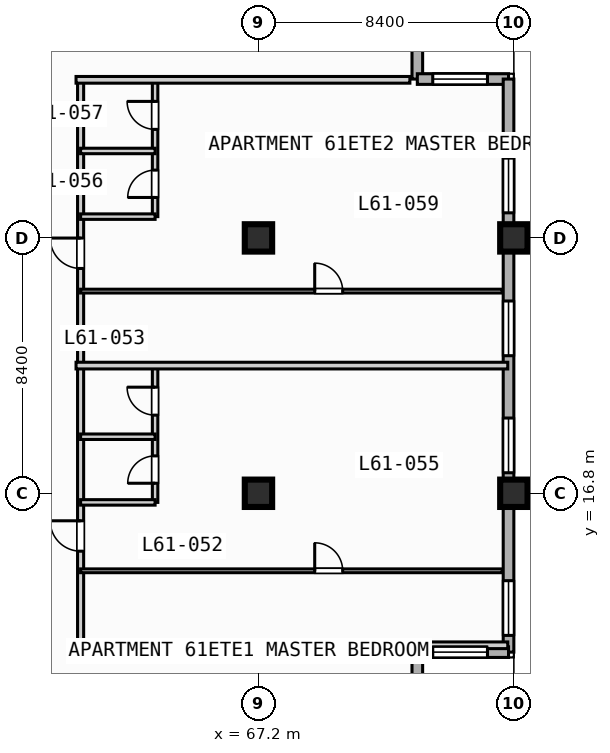
"""IFC4 building model, lengths in metres.
Left out: names, types, materials, properties, quantities, classifications, styles, units other than length and angle.
Written with IfcOpenShell. Run it as: python <this file> out.ifc"""

import sys

from ifc_helpers import new_model, si_unit, direction, frame, frame_2d, origin, origin_2d, place, context, subcontext, project, spatial, rectangle, extrude, element, fill, save


model = new_model("IFC4")
c1 = context("Model", 3, precision=1e-05, world=origin(), true_north=direction((0.0, 1.0)))
c2 = subcontext(c1, "Body", "Model", "MODEL_VIEW")
j1 = project(units=[si_unit("LENGTHUNIT", "METRE"), si_unit("PLANEANGLEUNIT", "RADIAN")], contexts=[c1])
p1 = place(None, origin())
s1 = spatial("IfcSite", under=j1, at=p1, CompositionType="ELEMENT")
p2 = place(p1, origin())
s2 = spatial("IfcBuilding", under=s1, at=p2, CompositionType="ELEMENT")
p3 = place(p2, frame((0.0, 0.0, 249.0)))
s3 = spatial("IfcBuildingStorey", under=s2, at=p3, CompositionType="ELEMENT", Elevation=249.0)
for number, where, z_axis, x_axis in (
    (1, (67.2, 16.8, 0.0), (0.0, 0.0, 1.0), (1.0, 0.0, 0.0)),
    (2, (67.2, 25.2, 0.0), (0.0, 0.0, 1.0), (1.0, 0.0, 0.0)),
    (3, (75.6, 16.8, 0.0), (0.0, 0.0, 1.0), (1.0, 0.0, 0.0)),
    (4, (75.6, 25.2, 0.0), (0.0, 0.0, 1.0), (1.0, 0.0, 0.0)),
):
    element("IfcColumn", number, at=place(p3, frame(where, z_axis=z_axis, x_axis=x_axis)), inside=s3, PredefinedType="COLUMN", context=c2, shape_type="SweptSolid", body=[
        extrude(rectangle(XDim=0.9, YDim=0.9, at=origin_2d()), origin(), (0.0, 0.0, 1.0), 3.7),
    ])
p4 = place(p3, frame((72.425, 33.425, 0.0), z_axis=(0.0, 0.0, 1.0), x_axis=(0.0, -1.0, 0.0)))
e5 = element("IfcWall", 5, at=p4, inside=s3, PredefinedType="STANDARD", context=c2, shape_type="SweptSolid", body=[
    extrude(rectangle(XDim=3.0, YDim=0.35, at=frame_2d((1.5, 0.0))), origin(), (0.0, 0.0, 1.0), 3.47),
])
p5 = place(p3, frame((72.425, 30.425, 0.0), z_axis=(0.0, 0.0, 1.0), x_axis=(1.0, 0.0, 0.0)))
e6 = element("IfcWall", 6, at=p5, inside=s3, PredefinedType="STANDARD", context=c2, shape_type="SweptSolid", body=[
    extrude(rectangle(XDim=3.0, YDim=0.35, at=frame_2d((1.5, 0.0))), origin(), (0.0, 0.0, 1.0), 3.47),
])
p6 = place(p5, frame((0.508, 0.0, 0.85)))
e7 = element("IfcOpeningElement", 7, at=p6, cuts=e6, PredefinedType="OPENING", context=c2, shape_type="SweptSolid", body=[
    extrude(rectangle(XDim=1.8, YDim=1.8, at=frame_2d((0.9, 0.9))), frame((0.0, 0.185, 0.0), z_axis=(0.0, -1.0, 0.0), x_axis=(1.0, 0.0, 0.0)), (0.0, 0.0, 1.0), 0.37),
])
p7 = place(p3, frame((75.425, 30.425, 0.0), z_axis=(0.0, 0.0, 1.0), x_axis=(0.0, -1.0, 0.0)))
e8 = element("IfcWall", 8, at=p7, inside=s3, PredefinedType="STANDARD", context=c2, shape_type="SweptSolid", body=[
    extrude(rectangle(XDim=18.85, YDim=0.35, at=frame_2d((9.425, 0.0))), origin(), (0.0, 0.0, 1.0), 3.47),
])
p8 = place(p7, frame((16.5, 0.0, 0.85)))
e9 = element("IfcOpeningElement", 9, at=p8, cuts=e8, PredefinedType="OPENING", context=c2, shape_type="SweptSolid", body=[
    extrude(rectangle(XDim=1.8, YDim=1.8, at=frame_2d((0.9, 0.9))), frame((0.0, 0.185, 0.0), z_axis=(0.0, -1.0, 0.0), x_axis=(1.0, 0.0, 0.0)), (0.0, 0.0, 1.0), 0.37),
])
p9 = place(p7, frame((11.15, 0.0, 0.85)))
e10 = element("IfcOpeningElement", 10, at=p9, cuts=e8, PredefinedType="OPENING", context=c2, shape_type="SweptSolid", body=[
    extrude(rectangle(XDim=1.8, YDim=1.8, at=frame_2d((0.9, 0.9))), frame((0.0, 0.185, 0.0), z_axis=(0.0, -1.0, 0.0), x_axis=(1.0, 0.0, 0.0)), (0.0, 0.0, 1.0), 0.37),
])
p10 = place(p7, frame((7.3, 0.0, 0.85)))
e11 = element("IfcOpeningElement", 11, at=p10, cuts=e8, PredefinedType="OPENING", context=c2, shape_type="SweptSolid", body=[
    extrude(rectangle(XDim=1.8, YDim=1.8, at=frame_2d((0.9, 0.9))), frame((0.0, 0.185, 0.0), z_axis=(0.0, -1.0, 0.0), x_axis=(1.0, 0.0, 0.0)), (0.0, 0.0, 1.0), 0.37),
])
p11 = place(p7, frame((2.6, 0.0, 0.85)))
e12 = element("IfcOpeningElement", 12, at=p11, cuts=e8, PredefinedType="OPENING", context=c2, shape_type="SweptSolid", body=[
    extrude(rectangle(XDim=1.8, YDim=1.8, at=frame_2d((0.9, 0.9))), frame((0.0, 0.185, 0.0), z_axis=(0.0, -1.0, 0.0), x_axis=(1.0, 0.0, 0.0)), (0.0, 0.0, 1.0), 0.37),
])
p12 = place(p3, frame((75.425, 11.575, 0.0), z_axis=(0.0, 0.0, 1.0), x_axis=(-1.0, 0.0, 0.0)))
e13 = element("IfcWall", 13, at=p12, inside=s3, PredefinedType="STANDARD", context=c2, shape_type="SweptSolid", body=[
    extrude(rectangle(XDim=3.0, YDim=0.35, at=frame_2d((1.5, 0.0))), origin(), (0.0, 0.0, 1.0), 3.47),
])
p13 = place(p12, frame((0.692, 0.0, 0.85)))
e14 = element("IfcOpeningElement", 14, at=p13, cuts=e13, PredefinedType="OPENING", context=c2, shape_type="SweptSolid", body=[
    extrude(rectangle(XDim=1.8, YDim=1.8, at=frame_2d((0.9, 0.9))), frame((0.0, 0.185, 0.0), z_axis=(0.0, -1.0, 0.0), x_axis=(1.0, 0.0, 0.0)), (0.0, 0.0, 1.0), 0.37),
])
p14 = place(p3, frame((72.425, 11.575, 0.0), z_axis=(0.0, 0.0, 1.0), x_axis=(0.0, -1.0, 0.0)))
e15 = element("IfcWall", 15, at=p14, inside=s3, PredefinedType="STANDARD", context=c2, shape_type="SweptSolid", body=[
    extrude(rectangle(XDim=3.0, YDim=0.35, at=frame_2d((1.5, 0.0))), origin(), (0.0, 0.0, 1.0), 3.47),
])
p15 = place(p3, frame((61.35, 11.8, 0.0), z_axis=(0.0, 0.0, 1.0), x_axis=(0.0, 1.0, 0.0)))
e16 = element("IfcWall", 16, at=p15, inside=s3, PredefinedType="PARTITIONING", context=c2, shape_type="SweptSolid", body=[
    extrude(rectangle(XDim=18.6, YDim=0.2, at=frame_2d((9.3, 0.0))), origin(), (0.0, 0.0, 1.0), 3.47),
])
p16 = place(p15, frame((3.095, 0.0, 0.0)))
e17 = element("IfcOpeningElement", 17, at=p16, cuts=e16, PredefinedType="OPENING", context=c2, shape_type="SweptSolid", body=[
    extrude(rectangle(XDim=1.0, YDim=2.15, at=frame_2d((0.5, 1.075))), frame((0.0, 0.11, 0.0), z_axis=(0.0, -1.0, 0.0), x_axis=(1.0, 0.0, 0.0)), (0.0, 0.0, 1.0), 0.22),
])
p17 = place(p15, frame((12.395, 0.0, 0.0)))
e18 = element("IfcOpeningElement", 18, at=p17, cuts=e16, PredefinedType="OPENING", context=c2, shape_type="SweptSolid", body=[
    extrude(rectangle(XDim=1.0, YDim=2.15, at=frame_2d((0.5, 1.075))), frame((0.0, 0.11, 0.0), z_axis=(0.0, -1.0, 0.0), x_axis=(1.0, 0.0, 0.0)), (0.0, 0.0, 1.0), 0.22),
])
p18 = place(p3, frame((61.2, 11.8, 0.0), z_axis=(0.0, 0.0, 1.0), x_axis=(1.0, 0.0, 0.0)))
e19 = element("IfcWall", 19, at=p18, inside=s3, PredefinedType="PARTITIONING", context=c2, shape_type="SweptSolid", body=[
    extrude(rectangle(XDim=14.2, YDim=0.22, at=frame_2d((7.1, 0.0))), origin(), (0.0, 0.0, 1.0), 3.47),
])
p19 = place(p3, frame((63.8, 16.5, 0.0), z_axis=(0.0, 0.0, 1.0), x_axis=(0.0, 1.0, 0.0)))
e20 = element("IfcWall", 20, at=p19, inside=s3, PredefinedType="PLUMBINGWALL", context=c2, shape_type="SweptSolid", body=[
    extrude(rectangle(XDim=4.5, YDim=0.18, at=frame_2d((2.25, 0.0))), origin(), (0.0, 0.0, 1.0), 3.47),
])
p20 = place(p19, frame((0.63, 0.0, 0.0)))
e21 = element("IfcOpeningElement", 21, at=p20, cuts=e20, PredefinedType="OPENING", context=c2, shape_type="SweptSolid", body=[
    extrude(rectangle(XDim=0.9, YDim=2.1, at=frame_2d((0.45, 1.05))), frame((0.0, 0.1, 0.0), z_axis=(0.0, -1.0, 0.0), x_axis=(1.0, 0.0, 0.0)), (0.0, 0.0, 1.0), 0.2),
])
p21 = place(p19, frame((2.87, 0.0, 0.0)))
e22 = element("IfcOpeningElement", 22, at=p21, cuts=e20, PredefinedType="OPENING", context=c2, shape_type="SweptSolid", body=[
    extrude(rectangle(XDim=0.92, YDim=2.1, at=frame_2d((0.46, 1.05))), frame((0.0, 0.1, 0.0), z_axis=(0.0, -1.0, 0.0), x_axis=(1.0, 0.0, 0.0)), (0.0, 0.0, 1.0), 0.2),
])
p22 = place(p3, frame((61.35, 16.5, 0.0), z_axis=(0.0, 0.0, 1.0), x_axis=(1.0, 0.0, 0.0)))
e23 = element("IfcWall", 23, at=p22, inside=s3, PredefinedType="PLUMBINGWALL", context=c2, shape_type="SweptSolid", body=[
    extrude(rectangle(XDim=2.45, YDim=0.18, at=frame_2d((1.225, 0.0))), origin(), (0.0, 0.0, 1.0), 2.82),
])
p23 = place(p3, frame((61.35, 18.66, 0.0), z_axis=(0.0, 0.0, 1.0), x_axis=(1.0, 0.0, 0.0)))
e24 = element("IfcWall", 24, at=p23, inside=s3, PredefinedType="PLUMBINGWALL", context=c2, shape_type="SweptSolid", body=[
    extrude(rectangle(XDim=2.45, YDim=0.18, at=frame_2d((1.225, 0.0))), origin(), (0.0, 0.0, 1.0), 3.47),
])
p24 = place(p3, frame((61.35, 14.25, 0.0), z_axis=(0.0, 0.0, 1.0), x_axis=(1.0, 0.0, 0.0)))
e25 = element("IfcWall", 25, at=p24, inside=s3, PredefinedType="PARTITIONING", context=c2, shape_type="SweptSolid", body=[
    extrude(rectangle(XDim=13.87, YDim=0.125, at=frame_2d((6.935, 0.0))), origin(), (0.0, 0.0, 1.0), 3.47),
])
p25 = place(p24, frame((7.7, 0.0, 0.0)))
e26 = element("IfcOpeningElement", 26, at=p25, cuts=e25, PredefinedType="OPENING", context=c2, shape_type="SweptSolid", body=[
    extrude(rectangle(XDim=0.92, YDim=2.1, at=frame_2d((0.46, 1.05))), frame((0.0, 0.073, 0.0), z_axis=(0.0, -1.0, 0.0), x_axis=(1.0, 0.0, 0.0)), (0.0, 0.0, 1.0), 0.145),
])
p26 = place(p3, frame((61.2, 21.0, 0.0), z_axis=(0.0, 0.0, 1.0), x_axis=(1.0, 0.0, 0.0)))
e27 = element("IfcWall", 27, at=p26, inside=s3, PredefinedType="PARTITIONING", context=c2, shape_type="SweptSolid", body=[
    extrude(rectangle(XDim=14.2, YDim=0.22, at=frame_2d((7.1, 0.0))), origin(), (0.0, 0.0, 1.0), 3.47),
])
p27 = place(p3, frame((63.8, 25.9, 0.0), z_axis=(0.0, 0.0, 1.0), x_axis=(0.0, 1.0, 0.0)))
e28 = element("IfcWall", 28, at=p27, inside=s3, PredefinedType="PLUMBINGWALL", context=c2, shape_type="SweptSolid", body=[
    extrude(rectangle(XDim=4.5, YDim=0.18, at=frame_2d((2.25, 0.0))), origin(), (0.0, 0.0, 1.0), 3.47),
])
p28 = place(p27, frame((0.63, 0.0, 0.0)))
e29 = element("IfcOpeningElement", 29, at=p28, cuts=e28, PredefinedType="OPENING", context=c2, shape_type="SweptSolid", body=[
    extrude(rectangle(XDim=0.9, YDim=2.1, at=frame_2d((0.45, 1.05))), frame((0.0, 0.1, 0.0), z_axis=(0.0, -1.0, 0.0), x_axis=(1.0, 0.0, 0.0)), (0.0, 0.0, 1.0), 0.2),
])
p29 = place(p27, frame((2.87, 0.0, 0.0)))
e30 = element("IfcOpeningElement", 30, at=p29, cuts=e28, PredefinedType="OPENING", context=c2, shape_type="SweptSolid", body=[
    extrude(rectangle(XDim=0.92, YDim=2.1, at=frame_2d((0.46, 1.05))), frame((0.0, 0.1, 0.0), z_axis=(0.0, -1.0, 0.0), x_axis=(1.0, 0.0, 0.0)), (0.0, 0.0, 1.0), 0.2),
])
for number, where, z_axis, x_axis in (
    (31, (61.35, 25.9, 0.0), (0.0, 0.0, 1.0), (1.0, 0.0, 0.0)),
    (32, (61.35, 28.06, 0.0), (0.0, 0.0, 1.0), (1.0, 0.0, 0.0)),
):
    element("IfcWall", number, at=place(p3, frame(where, z_axis=z_axis, x_axis=x_axis)), inside=s3, PredefinedType="PLUMBINGWALL", context=c2, shape_type="SweptSolid", body=[
        extrude(rectangle(XDim=2.45, YDim=0.18, at=frame_2d((1.225, 0.0))), origin(), (0.0, 0.0, 1.0), 3.47),
    ])
p30 = place(p3, frame((61.35, 23.45, 0.0), z_axis=(0.0, 0.0, 1.0), x_axis=(1.0, 0.0, 0.0)))
e33 = element("IfcWall", 33, at=p30, inside=s3, PredefinedType="PARTITIONING", context=c2, shape_type="SweptSolid", body=[
    extrude(rectangle(XDim=13.87, YDim=0.125, at=frame_2d((6.935, 0.0))), origin(), (0.0, 0.0, 1.0), 3.47),
])
p31 = place(p30, frame((7.7, 0.0, 0.0)))
e34 = element("IfcOpeningElement", 34, at=p31, cuts=e33, PredefinedType="OPENING", context=c2, shape_type="SweptSolid", body=[
    extrude(rectangle(XDim=0.92, YDim=2.1, at=frame_2d((0.46, 1.05))), frame((0.0, 0.073, 0.0), z_axis=(0.0, -1.0, 0.0), x_axis=(1.0, 0.0, 0.0)), (0.0, 0.0, 1.0), 0.145),
])
p32 = place(p3, frame((61.2, 30.4, 0.0), z_axis=(0.0, 0.0, 1.0), x_axis=(1.0, 0.0, 0.0)))
e35 = element("IfcWall", 35, at=p32, inside=s3, PredefinedType="PARTITIONING", context=c2, shape_type="SweptSolid", body=[
    extrude(rectangle(XDim=10.98, YDim=0.22, at=frame_2d((5.49, 0.0))), origin(), (0.0, 0.0, 1.0), 3.47),
])
p33 = place(p6, origin())
e36 = element("IfcWindow", 36, at=p33, inside=s3, PartitioningType="SINGLE_PANEL", PredefinedType="WINDOW", context=c2, shape_type="SweptSolid", body=[
    extrude(rectangle(XDim=1.8, YDim=1.8, at=frame_2d((0.9, 0.9))), frame((0.0, 0.03, 0.0), z_axis=(0.0, -1.0, 0.0), x_axis=(1.0, 0.0, 0.0)), (0.0, 0.0, 1.0), 0.06),
])
fill(e7, e36)
p34 = place(p8, origin())
e37 = element("IfcWindow", 37, at=p34, inside=s3, PartitioningType="SINGLE_PANEL", PredefinedType="WINDOW", context=c2, shape_type="SweptSolid", body=[
    extrude(rectangle(XDim=1.8, YDim=1.8, at=frame_2d((0.9, 0.9))), frame((0.0, 0.03, 0.0), z_axis=(0.0, -1.0, 0.0), x_axis=(1.0, 0.0, 0.0)), (0.0, 0.0, 1.0), 0.06),
])
fill(e9, e37)
p35 = place(p9, origin())
e38 = element("IfcWindow", 38, at=p35, inside=s3, PartitioningType="SINGLE_PANEL", PredefinedType="WINDOW", context=c2, shape_type="SweptSolid", body=[
    extrude(rectangle(XDim=1.8, YDim=1.8, at=frame_2d((0.9, 0.9))), frame((0.0, 0.03, 0.0), z_axis=(0.0, -1.0, 0.0), x_axis=(1.0, 0.0, 0.0)), (0.0, 0.0, 1.0), 0.06),
])
fill(e10, e38)
p36 = place(p10, origin())
e39 = element("IfcWindow", 39, at=p36, inside=s3, PartitioningType="SINGLE_PANEL", PredefinedType="WINDOW", context=c2, shape_type="SweptSolid", body=[
    extrude(rectangle(XDim=1.8, YDim=1.8, at=frame_2d((0.9, 0.9))), frame((0.0, 0.03, 0.0), z_axis=(0.0, -1.0, 0.0), x_axis=(1.0, 0.0, 0.0)), (0.0, 0.0, 1.0), 0.06),
])
fill(e11, e39)
p37 = place(p11, origin())
e40 = element("IfcWindow", 40, at=p37, inside=s3, PartitioningType="SINGLE_PANEL", PredefinedType="WINDOW", context=c2, shape_type="SweptSolid", body=[
    extrude(rectangle(XDim=1.8, YDim=1.8, at=frame_2d((0.9, 0.9))), frame((0.0, 0.03, 0.0), z_axis=(0.0, -1.0, 0.0), x_axis=(1.0, 0.0, 0.0)), (0.0, 0.0, 1.0), 0.06),
])
fill(e12, e40)
p38 = place(p13, origin())
e41 = element("IfcWindow", 41, at=p38, inside=s3, PartitioningType="SINGLE_PANEL", PredefinedType="WINDOW", context=c2, shape_type="SweptSolid", body=[
    extrude(rectangle(XDim=1.8, YDim=1.8, at=frame_2d((0.9, 0.9))), frame((0.0, 0.03, 0.0), z_axis=(0.0, -1.0, 0.0), x_axis=(1.0, 0.0, 0.0)), (0.0, 0.0, 1.0), 0.06),
])
fill(e14, e41)
p39 = place(p16, origin())
e42 = element("IfcDoor", 42, at=p39, inside=s3, OperationType="SINGLE_SWING_RIGHT", PredefinedType="DOOR", context=c2, shape_type="SweptSolid", body=[
    extrude(rectangle(XDim=1.0, YDim=2.15, at=frame_2d((0.5, 1.075))), frame((0.0, 0.025, 0.0), z_axis=(0.0, -1.0, 0.0), x_axis=(1.0, 0.0, 0.0)), (0.0, 0.0, 1.0), 0.05),
])
fill(e17, e42)
p40 = place(p17, origin())
e43 = element("IfcDoor", 43, at=p40, inside=s3, OperationType="SINGLE_SWING_RIGHT", PredefinedType="DOOR", context=c2, shape_type="SweptSolid", body=[
    extrude(rectangle(XDim=1.0, YDim=2.15, at=frame_2d((0.5, 1.075))), frame((0.0, 0.025, 0.0), z_axis=(0.0, -1.0, 0.0), x_axis=(1.0, 0.0, 0.0)), (0.0, 0.0, 1.0), 0.05),
])
fill(e18, e43)
p41 = place(p20, origin())
e44 = element("IfcDoor", 44, at=p41, inside=s3, OperationType="SINGLE_SWING_LEFT", PredefinedType="DOOR", context=c2, shape_type="SweptSolid", body=[
    extrude(rectangle(XDim=0.9, YDim=2.1, at=frame_2d((0.45, 1.05))), frame((0.0, 0.025, 0.0), z_axis=(0.0, -1.0, 0.0), x_axis=(1.0, 0.0, 0.0)), (0.0, 0.0, 1.0), 0.05),
])
fill(e21, e44)
p42 = place(p21, origin())
e45 = element("IfcDoor", 45, at=p42, inside=s3, OperationType="SINGLE_SWING_RIGHT", PredefinedType="DOOR", context=c2, shape_type="SweptSolid", body=[
    extrude(rectangle(XDim=0.92, YDim=2.1, at=frame_2d((0.46, 1.05))), frame((0.0, 0.025, 0.0), z_axis=(0.0, -1.0, 0.0), x_axis=(1.0, 0.0, 0.0)), (0.0, 0.0, 1.0), 0.05),
])
fill(e22, e45)
p43 = place(p25, origin())
e46 = element("IfcDoor", 46, at=p43, inside=s3, OperationType="SINGLE_SWING_LEFT", PredefinedType="DOOR", context=c2, shape_type="SweptSolid", body=[
    extrude(rectangle(XDim=0.92, YDim=2.1, at=frame_2d((0.46, 1.05))), frame((0.0, 0.025, 0.0), z_axis=(0.0, -1.0, 0.0), x_axis=(1.0, 0.0, 0.0)), (0.0, 0.0, 1.0), 0.05),
])
fill(e26, e46)
p44 = place(p28, origin())
e47 = element("IfcDoor", 47, at=p44, inside=s3, OperationType="SINGLE_SWING_LEFT", PredefinedType="DOOR", context=c2, shape_type="SweptSolid", body=[
    extrude(rectangle(XDim=0.9, YDim=2.1, at=frame_2d((0.45, 1.05))), frame((0.0, 0.025, 0.0), z_axis=(0.0, -1.0, 0.0), x_axis=(1.0, 0.0, 0.0)), (0.0, 0.0, 1.0), 0.05),
])
fill(e29, e47)
p45 = place(p29, origin())
e48 = element("IfcDoor", 48, at=p45, inside=s3, OperationType="SINGLE_SWING_RIGHT", PredefinedType="DOOR", context=c2, shape_type="SweptSolid", body=[
    extrude(rectangle(XDim=0.92, YDim=2.1, at=frame_2d((0.46, 1.05))), frame((0.0, 0.025, 0.0), z_axis=(0.0, -1.0, 0.0), x_axis=(1.0, 0.0, 0.0)), (0.0, 0.0, 1.0), 0.05),
])
fill(e30, e48)
p46 = place(p31, origin())
e49 = element("IfcDoor", 49, at=p46, inside=s3, OperationType="SINGLE_SWING_LEFT", PredefinedType="DOOR", context=c2, shape_type="SweptSolid", body=[
    extrude(rectangle(XDim=0.92, YDim=2.1, at=frame_2d((0.46, 1.05))), frame((0.0, 0.025, 0.0), z_axis=(0.0, -1.0, 0.0), x_axis=(1.0, 0.0, 0.0)), (0.0, 0.0, 1.0), 0.05),
])
fill(e34, e49)
save(model, sys.argv[1])
